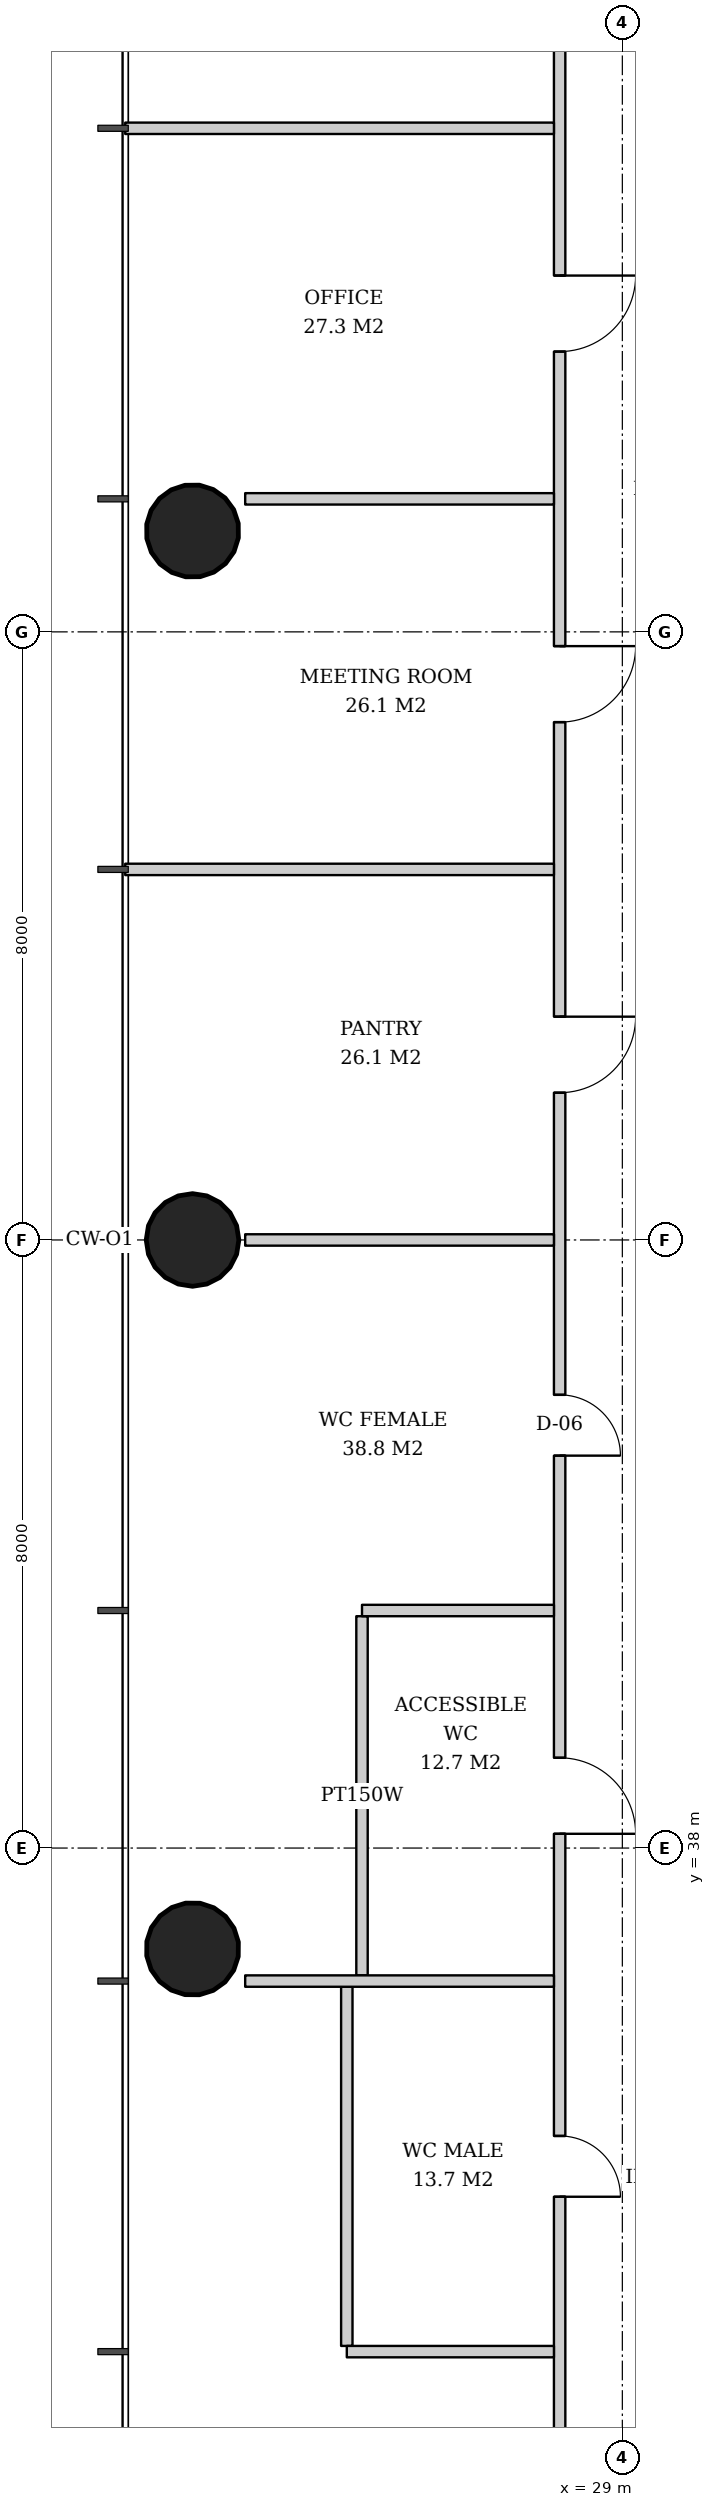
"""IFC4 building model, lengths in metres.
Left out: names, types, materials, properties, quantities, classifications, styles, units other than length and angle.
Written with IfcOpenShell. Run it as: python <this file> out.ifc"""

import sys

from ifc_helpers import new_model, si_unit, direction, frame, frame_2d, origin, origin_2d, place, context, subcontext, project, spatial, rectangle, hollow_circle, extrude, element, fill, save


model = new_model("IFC4")
c1 = context("Model", 3, precision=1e-05, world=origin(), true_north=direction((0.0, 1.0)))
c2 = subcontext(c1, "Body", "Model", "MODEL_VIEW")
j1 = project(units=[si_unit("LENGTHUNIT", "METRE"), si_unit("PLANEANGLEUNIT", "RADIAN")], contexts=[c1])
p1 = place(None, origin())
s1 = spatial("IfcSite", under=j1, at=p1, CompositionType="ELEMENT")
p2 = place(p1, origin())
s2 = spatial("IfcBuilding", under=s1, at=p2, CompositionType="ELEMENT")
p3 = place(p2, frame((0.0, 0.0, 93.2)))
s3 = spatial("IfcBuildingStorey", under=s2, at=p3, CompositionType="ELEMENT", Elevation=93.2)
p4 = place(p3, frame((23.307, 55.346, 0.0), z_axis=(0.031910269556, -0.015987237665, 0.999362868496), x_axis=(0.447933021895, 0.894067115991, 0.0)))
e1 = element("IfcColumn", 1, at=p4, inside=s3, PredefinedType="COLUMN", context=c2, shape_type="SweptSolid", body=[
    extrude(hollow_circle(Radius=0.61, WallThickness=0.04, at=origin_2d()), origin(), (0.0, 0.0, 1.0), 3.802),
])
p5 = place(p3, frame((23.307, 46.0, 0.0), z_axis=(0.031914348339, 0.0, 0.999490607445), x_axis=(0.0, 1.0, 0.0)))
e2 = element("IfcColumn", 2, at=p5, inside=s3, PredefinedType="COLUMN", context=c2, shape_type="SweptSolid", body=[
    extrude(hollow_circle(Radius=0.61, WallThickness=0.04, at=origin_2d()), origin(), (0.0, 0.0, 1.0), 3.802),
])
p6 = place(p3, frame((23.307, 36.654, 0.0), z_axis=(0.031910269556, 0.015987237665, 0.999362868496), x_axis=(-0.447933021895, 0.894067115991, 0.0)))
e3 = element("IfcColumn", 3, at=p6, inside=s3, PredefinedType="COLUMN", context=c2, shape_type="SweptSolid", body=[
    extrude(hollow_circle(Radius=0.61, WallThickness=0.04, at=origin_2d()), origin(), (0.0, 0.0, 1.0), 3.802),
])
p7 = place(p3, frame((25.575, 41.05, 0.0), z_axis=(0.0, 0.0, 1.0), x_axis=(0.0, -1.0, 0.0)))
e4 = element("IfcWall", 4, at=p7, inside=s3, PredefinedType="PARTITIONING", context=c2, shape_type="SweptSolid", body=[
    extrude(rectangle(XDim=4.725, YDim=0.15, at=frame_2d((2.363, 0.0))), origin(), (0.0, 0.0, 1.0), 2.806),
])
p8 = place(p3, frame((25.375, 36.175, 0.0), z_axis=(0.0, 0.0, 1.0), x_axis=(0.0, -1.0, 0.0)))
e5 = element("IfcWall", 5, at=p8, inside=s3, PredefinedType="PARTITIONING", context=c2, shape_type="SweptSolid", body=[
    extrude(rectangle(XDim=4.725, YDim=0.15, at=frame_2d((2.363, 0.0))), origin(), (0.0, 0.0, 1.0), 3.62),
])
p9 = place(p3, frame((28.175, 62.204, 0.0), z_axis=(0.0, 0.0, 1.0), x_axis=(0.0, -1.0, 0.0)))
e6 = element("IfcWall", 6, at=p9, inside=s3, PredefinedType="PARTITIONING", context=c2, shape_type="SweptSolid", body=[
    extrude(rectangle(XDim=32.409, YDim=0.15, at=frame_2d((16.204, 0.0))), origin(), (0.0, 0.0, 1.0), 2.72),
])
p10 = place(p9, frame((3.517, 0.0, 0.0)))
e7 = element("IfcOpeningElement", 7, at=p10, cuts=e6, PredefinedType="OPENING", context=c2, shape_type="SweptSolid", body=[
    extrude(rectangle(XDim=1.0, YDim=2.1, at=frame_2d((0.5, 1.05))), frame((0.0, 0.085, 0.0), z_axis=(0.0, -1.0, 0.0), x_axis=(1.0, 0.0, 0.0)), (0.0, 0.0, 1.0), 0.17),
])
p11 = place(p9, frame((8.392, 0.0, 0.0)))
e8 = element("IfcOpeningElement", 8, at=p11, cuts=e6, PredefinedType="OPENING", context=c2, shape_type="SweptSolid", body=[
    extrude(rectangle(XDim=1.0, YDim=2.1, at=frame_2d((0.5, 1.05))), frame((0.0, 0.085, 0.0), z_axis=(0.0, -1.0, 0.0), x_axis=(1.0, 0.0, 0.0)), (0.0, 0.0, 1.0), 0.17),
])
p12 = place(p9, frame((13.267, 0.0, 0.0)))
e9 = element("IfcOpeningElement", 9, at=p12, cuts=e6, PredefinedType="OPENING", context=c2, shape_type="SweptSolid", body=[
    extrude(rectangle(XDim=1.0, YDim=2.1, at=frame_2d((0.5, 1.05))), frame((0.0, 0.085, 0.0), z_axis=(0.0, -1.0, 0.0), x_axis=(1.0, 0.0, 0.0)), (0.0, 0.0, 1.0), 0.17),
])
p13 = place(p9, frame((18.242, 0.0, 0.0)))
e10 = element("IfcOpeningElement", 10, at=p13, cuts=e6, PredefinedType="OPENING", context=c2, shape_type="SweptSolid", body=[
    extrude(rectangle(XDim=0.8, YDim=2.1, at=frame_2d((0.4, 1.05))), frame((0.0, 0.085, 0.0), z_axis=(0.0, -1.0, 0.0), x_axis=(1.0, 0.0, 0.0)), (0.0, 0.0, 1.0), 0.17),
])
p14 = place(p9, frame((23.017, 0.0, 0.0)))
e11 = element("IfcOpeningElement", 11, at=p14, cuts=e6, PredefinedType="OPENING", context=c2, shape_type="SweptSolid", body=[
    extrude(rectangle(XDim=1.0, YDim=2.1, at=frame_2d((0.5, 1.05))), frame((0.0, 0.085, 0.0), z_axis=(0.0, -1.0, 0.0), x_axis=(1.0, 0.0, 0.0)), (0.0, 0.0, 1.0), 0.17),
])
p15 = place(p9, frame((27.992, 0.0, 0.0)))
e12 = element("IfcOpeningElement", 12, at=p15, cuts=e6, PredefinedType="OPENING", context=c2, shape_type="SweptSolid", body=[
    extrude(rectangle(XDim=0.8, YDim=2.1, at=frame_2d((0.4, 1.05))), frame((0.0, 0.085, 0.0), z_axis=(0.0, -1.0, 0.0), x_axis=(1.0, 0.0, 0.0)), (0.0, 0.0, 1.0), 0.17),
])
p16 = place(p3, frame((28.1, 60.625, 0.0), z_axis=(0.0, 0.0, 1.0), x_axis=(-1.0, 0.0, 0.0)))
e13 = element("IfcWall", 13, at=p16, inside=s3, PredefinedType="PARTITIONING", context=c2, shape_type="SweptSolid", body=[
    extrude(rectangle(XDim=5.64, YDim=0.15, at=frame_2d((2.82, 0.0))), origin(), (0.0, 0.0, 1.0), 2.82),
])
p17 = place(p3, frame((28.1, 55.75, 0.0), z_axis=(0.0, 0.0, 1.0), x_axis=(-1.0, 0.0, 0.0)))
e14 = element("IfcWall", 14, at=p17, inside=s3, PredefinedType="PARTITIONING", context=c2, shape_type="SweptSolid", body=[
    extrude(rectangle(XDim=4.062, YDim=0.15, at=frame_2d((2.031, 0.0))), origin(), (0.0, 0.0, 1.0), 3.62),
])
p18 = place(p3, frame((28.1, 50.875, 0.0), z_axis=(0.0, 0.0, 1.0), x_axis=(-1.0, 0.0, 0.0)))
e15 = element("IfcWall", 15, at=p18, inside=s3, PredefinedType="PARTITIONING", context=c2, shape_type="SweptSolid", body=[
    extrude(rectangle(XDim=5.64, YDim=0.15, at=frame_2d((2.82, 0.0))), origin(), (0.0, 0.0, 1.0), 2.82),
])
p19 = place(p3, frame((28.1, 46.0, 0.0), z_axis=(0.0, 0.0, 1.0), x_axis=(-1.0, 0.0, 0.0)))
e16 = element("IfcWall", 16, at=p19, inside=s3, PredefinedType="PARTITIONING", context=c2, shape_type="SweptSolid", body=[
    extrude(rectangle(XDim=4.062, YDim=0.15, at=frame_2d((2.031, 0.0))), origin(), (0.0, 0.0, 1.0), 2.858),
])
p20 = place(p3, frame((28.1, 41.125, 0.0), z_axis=(0.0, 0.0, 1.0), x_axis=(-1.0, 0.0, 0.0)))
e17 = element("IfcWall", 17, at=p20, inside=s3, PredefinedType="PARTITIONING", context=c2, shape_type="SweptSolid", body=[
    extrude(rectangle(XDim=2.525, YDim=0.15, at=frame_2d((1.263, 0.0))), origin(), (0.0, 0.0, 1.0), 3.62),
])
p21 = place(p3, frame((28.1, 36.25, 0.0), z_axis=(0.0, 0.0, 1.0), x_axis=(-1.0, 0.0, 0.0)))
e18 = element("IfcWall", 18, at=p21, inside=s3, PredefinedType="PARTITIONING", context=c2, shape_type="SweptSolid", body=[
    extrude(rectangle(XDim=4.062, YDim=0.15, at=frame_2d((2.031, 0.0))), origin(), (0.0, 0.0, 1.0), 3.62),
])
p22 = place(p3, frame((28.1, 31.375, 0.0), z_axis=(0.0, 0.0, 1.0), x_axis=(-1.0, 0.0, 0.0)))
e19 = element("IfcWall", 19, at=p22, inside=s3, PredefinedType="PARTITIONING", context=c2, shape_type="SweptSolid", body=[
    extrude(rectangle(XDim=2.725, YDim=0.15, at=frame_2d((1.363, 0.0))), origin(), (0.0, 0.0, 1.0), 3.62),
])
p23 = place(p10, origin())
e20 = element("IfcDoor", 20, at=p23, inside=s3, OperationType="SINGLE_SWING_LEFT", PredefinedType="DOOR", context=c2, shape_type="SweptSolid", body=[
    extrude(rectangle(XDim=1.0, YDim=2.1, at=frame_2d((0.5, 1.05))), frame((0.0, 0.025, 0.0), z_axis=(0.0, -1.0, 0.0), x_axis=(1.0, 0.0, 0.0)), (0.0, 0.0, 1.0), 0.05),
])
fill(e7, e20)
p24 = place(p11, origin())
e21 = element("IfcDoor", 21, at=p24, inside=s3, OperationType="SINGLE_SWING_LEFT", PredefinedType="DOOR", context=c2, shape_type="SweptSolid", body=[
    extrude(rectangle(XDim=1.0, YDim=2.1, at=frame_2d((0.5, 1.05))), frame((0.0, 0.025, 0.0), z_axis=(0.0, -1.0, 0.0), x_axis=(1.0, 0.0, 0.0)), (0.0, 0.0, 1.0), 0.05),
])
fill(e8, e21)
p25 = place(p12, origin())
e22 = element("IfcDoor", 22, at=p25, inside=s3, OperationType="SINGLE_SWING_LEFT", PredefinedType="DOOR", context=c2, shape_type="SweptSolid", body=[
    extrude(rectangle(XDim=1.0, YDim=2.1, at=frame_2d((0.5, 1.05))), frame((0.0, 0.025, 0.0), z_axis=(0.0, -1.0, 0.0), x_axis=(1.0, 0.0, 0.0)), (0.0, 0.0, 1.0), 0.05),
])
fill(e9, e22)
p26 = place(p13, origin())
e23 = element("IfcDoor", 23, at=p26, inside=s3, OperationType="SINGLE_SWING_RIGHT", PredefinedType="DOOR", context=c2, shape_type="SweptSolid", body=[
    extrude(rectangle(XDim=0.8, YDim=2.1, at=frame_2d((0.4, 1.05))), frame((0.0, 0.025, 0.0), z_axis=(0.0, -1.0, 0.0), x_axis=(1.0, 0.0, 0.0)), (0.0, 0.0, 1.0), 0.05),
])
fill(e10, e23)
p27 = place(p14, origin())
e24 = element("IfcDoor", 24, at=p27, inside=s3, OperationType="SINGLE_SWING_RIGHT", PredefinedType="DOOR", context=c2, shape_type="SweptSolid", body=[
    extrude(rectangle(XDim=1.0, YDim=2.1, at=frame_2d((0.5, 1.05))), frame((0.0, 0.025, 0.0), z_axis=(0.0, -1.0, 0.0), x_axis=(1.0, 0.0, 0.0)), (0.0, 0.0, 1.0), 0.05),
])
fill(e11, e24)
p28 = place(p15, origin())
e25 = element("IfcDoor", 25, at=p28, inside=s3, OperationType="SINGLE_SWING_RIGHT", PredefinedType="DOOR", context=c2, shape_type="SweptSolid", body=[
    extrude(rectangle(XDim=0.8, YDim=2.1, at=frame_2d((0.4, 1.05))), frame((0.0, 0.025, 0.0), z_axis=(0.0, -1.0, 0.0), x_axis=(1.0, 0.0, 0.0)), (0.0, 0.0, 1.0), 0.05),
])
fill(e12, e25)
save(model, sys.argv[1])
